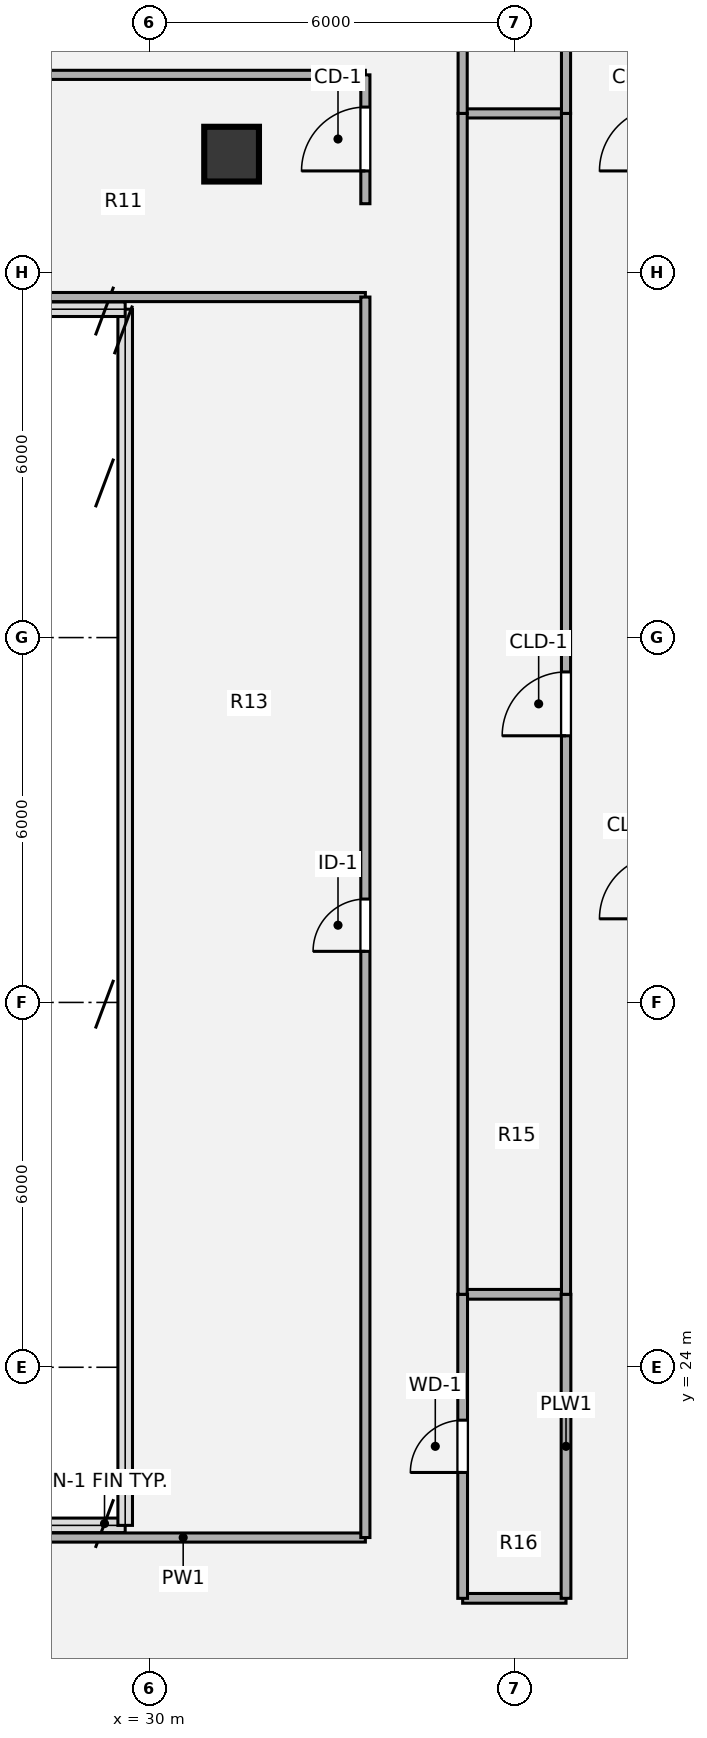
"""IFC4 building model, lengths in metres.
Left out: names, types, materials, properties, quantities, classifications, styles, units other than length and angle.
Written with IfcOpenShell. Run it as: python <this file> out.ifc"""

import sys

from ifc_helpers import new_model, si_unit, direction, frame, frame_2d, origin, origin_2d, place, context, subcontext, project, spatial, rectangle, hollow_circle, extrude, source, transform, mapped, element, fill, save


model = new_model("IFC4")
c1 = context("Model", 3, precision=1e-05, world=origin(), true_north=direction((0.0, 1.0)))
c2 = subcontext(c1, "Body", "Model", "MODEL_VIEW")
j1 = project(units=[si_unit("LENGTHUNIT", "METRE"), si_unit("PLANEANGLEUNIT", "RADIAN")], contexts=[c1])
p1 = place(None, origin())
s1 = spatial("IfcSite", under=j1, at=p1, CompositionType="ELEMENT")
p2 = place(p1, origin())
s2 = spatial("IfcBuilding", under=s1, at=p2, CompositionType="ELEMENT")
p3 = place(p2, frame((0.0, 0.0, 245.7)))
s3 = spatial("IfcBuildingStorey", under=s2, at=p3, CompositionType="ELEMENT", Elevation=245.7)
m1 = source(origin(), c2, "Body", "SweptSolid", [
    extrude(hollow_circle(Radius=0.45, WallThickness=0.032, at=origin_2d()), origin(), (0.0, 0.0, 1.0), 3.78),
])
p4 = place(p3, frame((31.35, 43.95, 0.0), z_axis=(0.0, 0.0, 1.0), x_axis=(1.0, 0.0, 0.0)))
e1 = element("IfcColumn", 1, at=p4, inside=s3, PredefinedType="COLUMN", context=c2, shape_type="MappedRepresentation", body=[
    mapped(m1, transform((0.0, 0.0, 0.0), x_axis=(1.0, 0.0, 0.0), y_axis=(0.0, 1.0, 0.0), z_axis=(0.0, 0.0, 1.0), scale=1.0)),
])
p5 = place(p3, frame((35.15, 20.2, 0.0), z_axis=(0.0, 0.0, 1.0), x_axis=(1.0, 0.0, 0.0)))
e2 = element("IfcWall", 2, at=p5, inside=s3, PredefinedType="PLUMBINGWALL", context=c2, shape_type="SweptSolid", body=[
    extrude(rectangle(XDim=1.7, YDim=0.16, at=frame_2d((0.85, 0.0))), origin(), (0.0, 0.0, 1.0), 3.5),
])
p6 = place(p3, frame((27.558, 21.2, 0.0), z_axis=(0.0, 0.0, 1.0), x_axis=(1.0, 0.0, 0.0)))
e3 = element("IfcWall", 3, at=p6, inside=s3, PredefinedType="PARTITIONING", context=c2, shape_type="SweptSolid", body=[
    extrude(rectangle(XDim=5.992, YDim=0.15, at=frame_2d((2.996, 0.0))), origin(), (0.0, 0.0, 1.0), 3.5),
])
p7 = place(p3, frame((35.15, 25.2, 0.0), z_axis=(0.0, 0.0, 1.0), x_axis=(1.0, 0.0, 0.0)))
e4 = element("IfcWall", 4, at=p7, inside=s3, PredefinedType="PLUMBINGWALL", context=c2, shape_type="SweptSolid", body=[
    extrude(rectangle(XDim=1.7, YDim=0.16, at=frame_2d((0.85, 0.0))), origin(), (0.0, 0.0, 1.0), 3.5),
])
p8 = place(p3, frame((27.558, 41.6, 0.0), z_axis=(0.0, 0.0, 1.0), x_axis=(1.0, 0.0, 0.0)))
e5 = element("IfcWall", 5, at=p8, inside=s3, PredefinedType="PARTITIONING", context=c2, shape_type="SweptSolid", body=[
    extrude(rectangle(XDim=5.992, YDim=0.15, at=frame_2d((2.996, 0.0))), origin(), (0.0, 0.0, 1.0), 3.5),
])
p9 = place(p3, frame((35.15, 44.62, 0.0), z_axis=(0.0, 0.0, 1.0), x_axis=(1.0, 0.0, 0.0)))
e6 = element("IfcWall", 6, at=p9, inside=s3, PredefinedType="PARTITIONING", context=c2, shape_type="SweptSolid", body=[
    extrude(rectangle(XDim=1.7, YDim=0.15, at=frame_2d((0.85, 0.0))), origin(), (0.0, 0.0, 1.0), 3.259),
])
p10 = place(p3, frame((27.35, 45.254, 0.0), z_axis=(0.0, 0.0, 1.0), x_axis=(1.0, 0.0, 0.0)))
e7 = element("IfcWall", 7, at=p10, inside=s3, PredefinedType="PARTITIONING", context=c2, shape_type="SweptSolid", body=[
    extrude(rectangle(XDim=6.2, YDim=0.15, at=frame_2d((3.1, 0.0))), origin(), (0.0, 0.0, 1.0), 2.982),
])
p11 = place(p3, frame((33.55, 21.2, 0.0), z_axis=(0.0, 0.0, 1.0), x_axis=(0.0, 1.0, 0.0)))
e8 = element("IfcWall", 8, at=p11, inside=s3, PredefinedType="PARTITIONING", context=c2, shape_type="SweptSolid", body=[
    extrude(rectangle(XDim=20.4, YDim=0.15, at=frame_2d((10.2, 0.0))), origin(), (0.0, 0.0, 1.0), 3.5),
])
p12 = place(p11, frame((9.64, 0.0, 0.0)))
e9 = element("IfcOpeningElement", 9, at=p12, cuts=e8, PredefinedType="OPENING", context=c2, shape_type="SweptSolid", body=[
    extrude(rectangle(XDim=0.86, YDim=2.1, at=origin_2d()), frame((0.43, 0.085, 1.05), z_axis=(0.0, -1.0, 0.0), x_axis=(1.0, 0.0, 0.0)), (0.0, 0.0, 1.0), 0.17),
])
p13 = place(p3, frame((33.55, 43.135, 0.0), z_axis=(0.0, 0.0, 1.0), x_axis=(0.0, 1.0, 0.0)))
e10 = element("IfcWall", 10, at=p13, inside=s3, PredefinedType="PARTITIONING", context=c2, shape_type="SweptSolid", body=[
    extrude(rectangle(XDim=2.119, YDim=0.15, at=frame_2d((1.06, 0.0))), origin(), (0.0, 0.0, 1.0), 3.5),
])
p14 = place(p13, frame((0.539, 0.0, 0.0)))
e11 = element("IfcOpeningElement", 11, at=p14, cuts=e10, PredefinedType="OPENING", context=c2, shape_type="SweptSolid", body=[
    extrude(rectangle(XDim=1.05, YDim=2.1, at=origin_2d()), frame((0.525, 0.085, 1.05), z_axis=(0.0, -1.0, 0.0), x_axis=(1.0, 0.0, 0.0)), (0.0, 0.0, 1.0), 0.17),
])
p15 = place(p3, frame((35.15, 20.2, 0.0), z_axis=(0.0, 0.0, 1.0), x_axis=(0.0, 1.0, 0.0)))
e12 = element("IfcWall", 12, at=p15, inside=s3, PredefinedType="PLUMBINGWALL", context=c2, shape_type="SweptSolid", body=[
    extrude(rectangle(XDim=5.0, YDim=0.16, at=frame_2d((2.5, 0.0))), origin(), (0.0, 0.0, 1.0), 3.5),
])
p16 = place(p15, frame((2.07, 0.0, 0.0)))
e13 = element("IfcOpeningElement", 13, at=p16, cuts=e12, PredefinedType="OPENING", context=c2, shape_type="SweptSolid", body=[
    extrude(rectangle(XDim=0.86, YDim=2.1, at=origin_2d()), frame((0.43, 0.09, 1.05), z_axis=(0.0, -1.0, 0.0), x_axis=(1.0, 0.0, 0.0)), (0.0, 0.0, 1.0), 0.18),
])
p17 = place(p3, frame((35.15, 25.2, 0.0), z_axis=(0.0, 0.0, 1.0), x_axis=(0.0, 1.0, 0.0)))
e14 = element("IfcWall", 14, at=p17, inside=s3, PredefinedType="PARTITIONING", context=c2, shape_type="SweptSolid", body=[
    extrude(rectangle(XDim=19.42, YDim=0.15, at=frame_2d((9.71, 0.0))), origin(), (0.0, 0.0, 1.0), 3.5),
])
p18 = place(p3, frame((35.15, 44.62, 0.0), z_axis=(0.0, 0.0, 1.0), x_axis=(0.0, 1.0, 0.0)))
e15 = element("IfcWall", 15, at=p18, inside=s3, PredefinedType="PARTITIONING", context=c2, shape_type="SweptSolid", body=[
    extrude(rectangle(XDim=12.58, YDim=0.15, at=frame_2d((6.29, 0.0))), origin(), (0.0, 0.0, 1.0), 3.5),
])
p19 = place(p18, frame((5.83, 0.0, 0.0)))
e16 = element("IfcOpeningElement", 16, at=p19, cuts=e15, PredefinedType="OPENING", context=c2, shape_type="SweptSolid", body=[
    extrude(rectangle(XDim=0.86, YDim=2.1, at=origin_2d()), frame((0.43, 0.085, 1.05), z_axis=(0.0, -1.0, 0.0), x_axis=(1.0, 0.0, 0.0)), (0.0, 0.0, 1.0), 0.17),
])
p20 = place(p3, frame((36.85, 20.2, 0.0), z_axis=(0.0, 0.0, 1.0), x_axis=(0.0, 1.0, 0.0)))
e17 = element("IfcWall", 17, at=p20, inside=s3, PredefinedType="PLUMBINGWALL", context=c2, shape_type="SweptSolid", body=[
    extrude(rectangle(XDim=5.0, YDim=0.16, at=frame_2d((2.5, 0.0))), origin(), (0.0, 0.0, 1.0), 3.5),
])
p21 = place(p3, frame((36.85, 25.2, 0.0), z_axis=(0.0, 0.0, 1.0), x_axis=(0.0, 1.0, 0.0)))
e18 = element("IfcWall", 18, at=p21, inside=s3, PredefinedType="PARTITIONING", context=c2, shape_type="SweptSolid", body=[
    extrude(rectangle(XDim=19.42, YDim=0.15, at=frame_2d((9.71, 0.0))), origin(), (0.0, 0.0, 1.0), 3.5),
])
p22 = place(p21, frame((9.185, 0.0, 0.0)))
e19 = element("IfcOpeningElement", 19, at=p22, cuts=e18, PredefinedType="OPENING", context=c2, shape_type="SweptSolid", body=[
    extrude(rectangle(XDim=1.05, YDim=2.1, at=origin_2d()), frame((0.525, 0.085, 1.05), z_axis=(0.0, -1.0, 0.0), x_axis=(1.0, 0.0, 0.0)), (0.0, 0.0, 1.0), 0.17),
])
p23 = place(p3, frame((36.85, 44.62, 0.0), z_axis=(0.0, 0.0, 1.0), x_axis=(0.0, 1.0, 0.0)))
e20 = element("IfcWall", 20, at=p23, inside=s3, PredefinedType="PARTITIONING", context=c2, shape_type="SweptSolid", body=[
    extrude(rectangle(XDim=12.58, YDim=0.15, at=frame_2d((6.29, 0.0))), origin(), (0.0, 0.0, 1.0), 3.5),
])
m2 = source(origin(), c2, "Body", "SweptSolid", [
    extrude(rectangle(XDim=0.86, YDim=2.1, at=origin_2d()), frame((0.43, 0.025, 1.05), z_axis=(0.0, -1.0, 0.0), x_axis=(1.0, 0.0, 0.0)), (0.0, 0.0, 1.0), 0.05),
])
p24 = place(p12, origin())
e21 = element("IfcDoor", 21, at=p24, inside=s3, OperationType="SINGLE_SWING_LEFT", PredefinedType="DOOR", context=c2, shape_type="MappedRepresentation", body=[
    mapped(m2, transform((0.0, 0.0, 0.0), x_axis=(1.0, 0.0, 0.0), y_axis=(0.0, 1.0, 0.0), z_axis=(0.0, 0.0, 1.0), scale=1.0)),
])
fill(e9, e21)
m3 = source(origin(), c2, "Body", "SweptSolid", [
    extrude(rectangle(XDim=1.05, YDim=2.1, at=origin_2d()), frame((0.525, 0.025, 1.05), z_axis=(0.0, -1.0, 0.0), x_axis=(1.0, 0.0, 0.0)), (0.0, 0.0, 1.0), 0.05),
])
p25 = place(p14, origin())
e22 = element("IfcDoor", 22, at=p25, inside=s3, OperationType="SINGLE_SWING_LEFT", PredefinedType="DOOR", context=c2, shape_type="MappedRepresentation", body=[
    mapped(m3, transform((0.0, 0.0, 0.0), x_axis=(1.0, 0.0, 0.0), y_axis=(0.0, 1.0, 0.0), z_axis=(0.0, 0.0, 1.0), scale=1.0)),
])
fill(e11, e22)
m4 = source(origin(), c2, "Body", "SweptSolid", [
    extrude(rectangle(XDim=0.86, YDim=2.1, at=origin_2d()), frame((0.43, 0.025, 1.05), z_axis=(0.0, -1.0, 0.0), x_axis=(1.0, 0.0, 0.0)), (0.0, 0.0, 1.0), 0.05),
])
p26 = place(p16, origin())
e23 = element("IfcDoor", 23, at=p26, inside=s3, OperationType="SINGLE_SWING_LEFT", PredefinedType="DOOR", context=c2, shape_type="MappedRepresentation", body=[
    mapped(m4, transform((0.0, 0.0, 0.0), x_axis=(1.0, 0.0, 0.0), y_axis=(0.0, 1.0, 0.0), z_axis=(0.0, 0.0, 1.0), scale=1.0)),
])
fill(e13, e23)
m5 = source(origin(), c2, "Body", "SweptSolid", [
    extrude(rectangle(XDim=1.05, YDim=2.1, at=origin_2d()), frame((0.525, 0.025, 1.05), z_axis=(0.0, -1.0, 0.0), x_axis=(1.0, 0.0, 0.0)), (0.0, 0.0, 1.0), 0.05),
])
p27 = place(p22, origin())
e24 = element("IfcDoor", 24, at=p27, inside=s3, OperationType="SINGLE_SWING_LEFT", PredefinedType="DOOR", context=c2, shape_type="MappedRepresentation", body=[
    mapped(m5, transform((0.0, 0.0, 0.0), x_axis=(1.0, 0.0, 0.0), y_axis=(0.0, 1.0, 0.0), z_axis=(0.0, 0.0, 1.0), scale=1.0)),
])
fill(e19, e24)
save(model, sys.argv[1])
